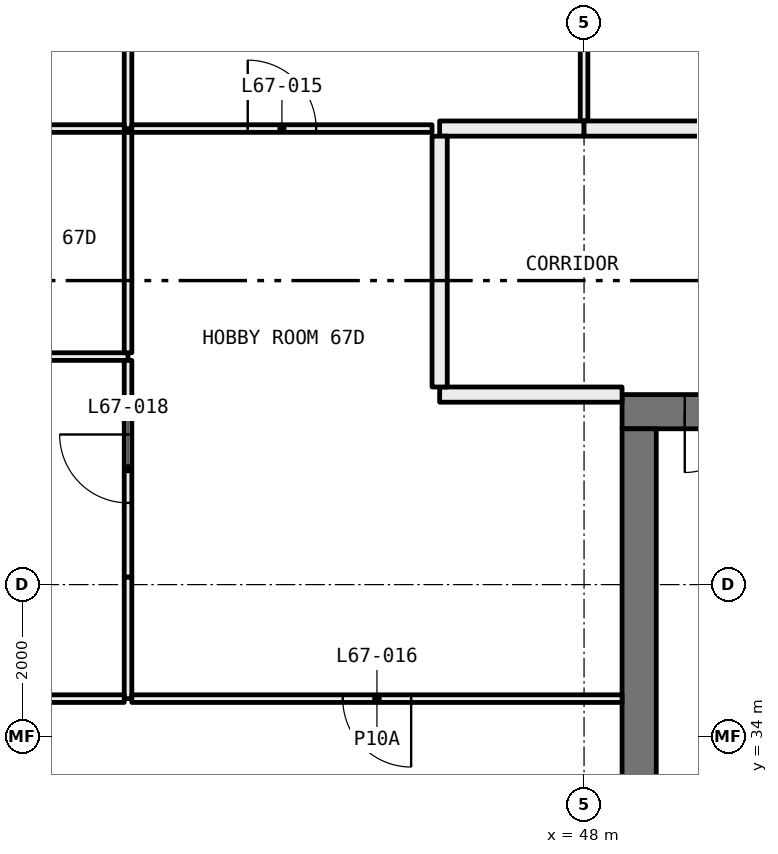
"""IFC4 building model, lengths in metres.
Left out: names, types, materials, properties, quantities, classifications, styles, units other than length and angle.
Written with IfcOpenShell. Run it as: python <this file> out.ifc"""

import sys

from ifc_helpers import new_model, si_unit, direction, frame, frame_2d, origin, place, context, subcontext, project, spatial, rectangle, extrude, element, fill, save


model = new_model("IFC4")
c1 = context("Model", 3, precision=1e-05, world=origin(), true_north=direction((0.0, 1.0)))
c2 = subcontext(c1, "Body", "Model", "MODEL_VIEW")
j1 = project(units=[si_unit("LENGTHUNIT", "METRE"), si_unit("PLANEANGLEUNIT", "RADIAN")], contexts=[c1])
p1 = place(None, origin())
s1 = spatial("IfcSite", under=j1, at=p1, CompositionType="ELEMENT")
p2 = place(p1, origin())
s2 = spatial("IfcBuilding", under=s1, at=p2, CompositionType="ELEMENT")
p3 = place(p2, frame((0.0, 0.0, 249.0)))
s3 = spatial("IfcBuildingStorey", under=s2, at=p3, CompositionType="ELEMENT", Elevation=249.0)
p4 = place(p3, frame((42.0, 42.0, 0.0), z_axis=(0.0, 0.0, 1.0), x_axis=(0.0, 1.0, 0.0)))
e1 = element("IfcWall", 1, at=p4, inside=s3, PredefinedType="PARTITIONING", context=c2, shape_type="SweptSolid", body=[
    extrude(rectangle(XDim=5.28, YDim=0.1, at=frame_2d((2.64, 0.0))), origin(), (0.0, 0.0, 1.0), 3.05),
])
p5 = place(p4, frame((2.19, 0.0, 0.0)))
e2 = element("IfcOpeningElement", 2, at=p5, cuts=e1, PredefinedType="OPENING", context=c2, shape_type="SweptSolid", body=[
    extrude(rectangle(XDim=0.9, YDim=2.1, at=frame_2d((0.45, 1.05))), frame((0.0, 0.06, 0.0), z_axis=(0.0, -1.0, 0.0), x_axis=(1.0, 0.0, 0.0)), (0.0, 0.0, 1.0), 0.12),
])
p6 = place(p3, frame((36.1, 42.0, 0.0), z_axis=(0.0, 0.0, 1.0), x_axis=(1.0, 0.0, 0.0)))
e3 = element("IfcWall", 3, at=p6, inside=s3, PredefinedType="PARTITIONING", context=c2, shape_type="SweptSolid", body=[
    extrude(rectangle(XDim=5.85, YDim=0.1, at=frame_2d((2.925, 0.0))), origin(), (0.0, 0.0, 1.0), 3.05),
])
p7 = place(p3, frame((48.0, 42.1, 0.0), z_axis=(0.0, 0.0, 1.0), x_axis=(0.0, 1.0, 0.0)))
e4 = element("IfcWall", 4, at=p7, inside=s3, PredefinedType="PARTITIONING", context=c2, shape_type="SweptSolid", body=[
    extrude(rectangle(XDim=5.18, YDim=0.1, at=frame_2d((2.59, 0.0))), origin(), (0.0, 0.0, 1.0), 3.05),
])
p8 = place(p7, frame((2.14, 0.0, 0.0)))
e5 = element("IfcOpeningElement", 5, at=p8, cuts=e4, PredefinedType="OPENING", context=c2, shape_type="SweptSolid", body=[
    extrude(rectangle(XDim=0.9, YDim=2.1, at=frame_2d((0.45, 1.05))), frame((0.0, 0.06, 0.0), z_axis=(0.0, -1.0, 0.0), x_axis=(1.0, 0.0, 0.0)), (0.0, 0.0, 1.0), 0.12),
])
p9 = place(p3, frame((42.05, 42.0, 0.0), z_axis=(0.0, 0.0, 1.0), x_axis=(1.0, 0.0, 0.0)))
e6 = element("IfcWall", 6, at=p9, inside=s3, PredefinedType="PARTITIONING", context=c2, shape_type="SweptSolid", body=[
    extrude(rectangle(XDim=3.95, YDim=0.1, at=frame_2d((1.975, 0.0))), origin(), (0.0, 0.0, 1.0), 3.05),
])
p10 = place(p9, frame((1.525, 0.0, 0.0)))
e7 = element("IfcOpeningElement", 7, at=p10, cuts=e6, PredefinedType="OPENING", context=c2, shape_type="SweptSolid", body=[
    extrude(rectangle(XDim=0.9, YDim=2.1, at=frame_2d((0.45, 1.05))), frame((0.0, 0.06, 0.0), z_axis=(0.0, -1.0, 0.0), x_axis=(1.0, 0.0, 0.0)), (0.0, 0.0, 1.0), 0.12),
])
p11 = place(p3, frame((46.1, 42.0, 0.0), z_axis=(0.0, 0.0, 1.0), x_axis=(1.0, 0.0, 0.0)))
e8 = element("IfcWall", 8, at=p11, inside=s3, PredefinedType="PARTITIONING", context=c2, shape_type="SweptSolid", body=[
    extrude(rectangle(XDim=1.9, YDim=0.2, at=frame_2d((0.95, 0.0))), origin(), (0.0, 0.0, 1.0), 3.05),
])
p12 = place(p3, frame((48.0, 42.0, 0.0), z_axis=(0.0, 0.0, 1.0), x_axis=(1.0, 0.0, 0.0)))
e9 = element("IfcWall", 9, at=p12, inside=s3, PredefinedType="PARTITIONING", context=c2, shape_type="SweptSolid", body=[
    extrude(rectangle(XDim=3.5, YDim=0.2, at=frame_2d((1.75, 0.0))), origin(), (0.0, 0.0, 1.0), 3.05),
])
p13 = place(p3, frame((42.0, 39.0, 0.0), z_axis=(0.0, 0.0, 1.0), x_axis=(-1.0, 0.0, 0.0)))
e10 = element("IfcWall", 10, at=p13, inside=s3, PredefinedType="PARTITIONING", context=c2, shape_type="SweptSolid", body=[
    extrude(rectangle(XDim=5.9, YDim=0.1, at=frame_2d((2.95, 0.0))), origin(), (0.0, 0.0, 1.0), 3.05),
])
p14 = place(p13, frame((2.5, 0.0, 0.0)))
e11 = element("IfcOpeningElement", 11, at=p14, cuts=e10, PredefinedType="OPENING", context=c2, shape_type="SweptSolid", body=[
    extrude(rectangle(XDim=0.9, YDim=2.1, at=frame_2d((0.45, 1.05))), frame((0.0, 0.06, 0.0), z_axis=(0.0, -1.0, 0.0), x_axis=(1.0, 0.0, 0.0)), (0.0, 0.0, 1.0), 0.12),
])
p15 = place(p3, frame((42.0, 34.5, 0.0), z_axis=(0.0, 0.0, 1.0), x_axis=(0.0, 1.0, 0.0)))
e12 = element("IfcWall", 12, at=p15, inside=s3, PredefinedType="PARTITIONING", context=c2, shape_type="SweptSolid", body=[
    extrude(rectangle(XDim=1.6, YDim=0.1, at=frame_2d((0.8, 0.0))), origin(), (0.0, 0.0, 1.0), 2.45),
])
p16 = place(p3, frame((42.0, 36.1, 0.0), z_axis=(0.0, 0.0, 1.0), x_axis=(0.0, 1.0, 0.0)))
e13 = element("IfcWall", 13, at=p16, inside=s3, PredefinedType="PARTITIONING", context=c2, shape_type="SweptSolid", body=[
    extrude(rectangle(XDim=2.85, YDim=0.1, at=frame_2d((1.425, 0.0))), origin(), (0.0, 0.0, 1.0), 3.05),
])
p17 = place(p16, frame((0.975, 0.0, 0.0)))
e14 = element("IfcOpeningElement", 14, at=p17, cuts=e13, PredefinedType="OPENING", context=c2, shape_type="SweptSolid", body=[
    extrude(rectangle(XDim=0.9, YDim=2.1, at=frame_2d((0.45, 1.05))), frame((0.0, 0.06, 0.0), z_axis=(0.0, -1.0, 0.0), x_axis=(1.0, 0.0, 0.0)), (0.0, 0.0, 1.0), 0.12),
])
p18 = place(p3, frame((40.575, 34.5, 0.0), z_axis=(0.0, 0.0, 1.0), x_axis=(1.0, 0.0, 0.0)))
e15 = element("IfcWall", 15, at=p18, inside=s3, PredefinedType="PARTITIONING", context=c2, shape_type="SweptSolid", body=[
    extrude(rectangle(XDim=1.375, YDim=0.1, at=frame_2d((0.688, 0.0))), origin(), (0.0, 0.0, 1.0), 3.05),
])
p19 = place(p3, frame((42.0, 39.05, 0.0), z_axis=(0.0, 0.0, 1.0), x_axis=(0.0, 1.0, 0.0)))
e16 = element("IfcWall", 16, at=p19, inside=s3, PredefinedType="PARTITIONING", context=c2, shape_type="SweptSolid", body=[
    extrude(rectangle(XDim=2.9, YDim=0.1, at=frame_2d((1.45, 0.0))), origin(), (0.0, 0.0, 1.0), 3.05),
])
p20 = place(p3, frame((42.05, 34.5, 0.0), z_axis=(0.0, 0.0, 1.0), x_axis=(1.0, 0.0, 0.0)))
e17 = element("IfcWall", 17, at=p20, inside=s3, PredefinedType="PARTITIONING", context=c2, shape_type="SweptSolid", body=[
    extrude(rectangle(XDim=6.45, YDim=0.1, at=frame_2d((3.225, 0.0))), origin(), (0.0, 0.0, 1.0), 3.05),
])
p21 = place(p20, frame((2.775, 0.0, 0.0)))
e18 = element("IfcOpeningElement", 18, at=p21, cuts=e17, PredefinedType="OPENING", context=c2, shape_type="SweptSolid", body=[
    extrude(rectangle(XDim=0.9, YDim=2.1, at=frame_2d((0.45, 1.05))), frame((0.0, 0.06, 0.0), z_axis=(0.0, -1.0, 0.0), x_axis=(1.0, 0.0, 0.0)), (0.0, 0.0, 1.0), 0.12),
])
p22 = place(p3, frame((48.5, 38.5, 0.0), z_axis=(0.0, 0.0, 1.0), x_axis=(-1.0, 0.0, 0.0)))
e19 = element("IfcWall", 19, at=p22, inside=s3, PredefinedType="PARTITIONING", context=c2, shape_type="SweptSolid", body=[
    extrude(rectangle(XDim=2.4, YDim=0.2, at=frame_2d((1.2, 0.0))), origin(), (0.0, 0.0, 1.0), 3.05),
])
p23 = place(p3, frame((46.1, 38.6, 0.0), z_axis=(0.0, 0.0, 1.0), x_axis=(0.0, 1.0, 0.0)))
e20 = element("IfcWall", 20, at=p23, inside=s3, PredefinedType="PARTITIONING", context=c2, shape_type="SweptSolid", body=[
    extrude(rectangle(XDim=3.3, YDim=0.2, at=frame_2d((1.65, 0.0))), origin(), (0.0, 0.0, 1.0), 3.05),
])
p24 = place(p3, frame((59.5, 38.275, 0.0), z_axis=(0.0, 0.0, 1.0), x_axis=(-1.0, 0.0, 0.0)))
e21 = element("IfcWall", 21, at=p24, inside=s3, PredefinedType="SHEAR", context=c2, shape_type="SweptSolid", body=[
    extrude(rectangle(XDim=11.0, YDim=0.45, at=frame_2d((5.5, 0.0))), origin(), (0.0, 0.0, 1.0), 3.05),
])
p25 = place(p24, frame((8.575, 0.0, 0.0)))
e22 = element("IfcOpeningElement", 22, at=p25, cuts=e21, PredefinedType="OPENING", context=c2, shape_type="SweptSolid", body=[
    extrude(rectangle(XDim=1.6, YDim=2.1, at=frame_2d((0.8, 1.05))), frame((0.0, 0.235, 0.0), z_axis=(0.0, -1.0, 0.0), x_axis=(1.0, 0.0, 0.0)), (0.0, 0.0, 1.0), 0.47),
])
p26 = place(p3, frame((48.725, 21.95, 0.0), z_axis=(0.0, 0.0, 1.0), x_axis=(0.0, 1.0, 0.0)))
e23 = element("IfcWall", 23, at=p26, inside=s3, PredefinedType="SHEAR", context=c2, shape_type="SweptSolid", body=[
    extrude(rectangle(XDim=16.1, YDim=0.45, at=frame_2d((8.05, 0.0))), origin(), (0.0, 0.0, 1.0), 3.05),
])
p27 = place(p26, frame((7.25, 0.0, 0.0)))
e24 = element("IfcOpeningElement", 24, at=p27, cuts=e23, PredefinedType="OPENING", context=c2, shape_type="SweptSolid", body=[
    extrude(rectangle(XDim=1.6, YDim=2.1, at=frame_2d((0.8, 1.05))), frame((0.0, 0.235, 0.0), z_axis=(0.0, -1.0, 0.0), x_axis=(1.0, 0.0, 0.0)), (0.0, 0.0, 1.0), 0.47),
])
p28 = place(p10, origin())
e25 = element("IfcDoor", 25, at=p28, inside=s3, OperationType="SINGLE_SWING_RIGHT", PredefinedType="DOOR", context=c2, shape_type="SweptSolid", body=[
    extrude(rectangle(XDim=0.9, YDim=2.1, at=frame_2d((0.45, 1.05))), frame((0.0, 0.025, 0.0), z_axis=(0.0, -1.0, 0.0), x_axis=(1.0, 0.0, 0.0)), (0.0, 0.0, 1.0), 0.05),
])
fill(e7, e25)
p29 = place(p21, frame((0.9, 0.0, 0.0), x_axis=(-1.0, 0.0, 0.0)))
e26 = element("IfcDoor", 26, at=p29, inside=s3, OperationType="SINGLE_SWING_RIGHT", PredefinedType="DOOR", context=c2, shape_type="SweptSolid", body=[
    extrude(rectangle(XDim=0.9, YDim=2.1, at=frame_2d((0.45, 1.05))), frame((0.0, 0.025, 0.0), z_axis=(0.0, -1.0, 0.0), x_axis=(1.0, 0.0, 0.0)), (0.0, 0.0, 1.0), 0.05),
])
fill(e18, e26)
p30 = place(p17, origin())
e27 = element("IfcDoor", 27, at=p30, inside=s3, OperationType="SINGLE_SWING_LEFT", PredefinedType="DOOR", context=c2, shape_type="SweptSolid", body=[
    extrude(rectangle(XDim=0.9, YDim=2.1, at=frame_2d((0.45, 1.05))), frame((0.0, 0.025, 0.0), z_axis=(0.0, -1.0, 0.0), x_axis=(1.0, 0.0, 0.0)), (0.0, 0.0, 1.0), 0.05),
])
fill(e14, e27)
p31 = place(p25, origin())
e28 = element("IfcDoor", 28, at=p31, inside=s3, OperationType="DOUBLE_DOOR_SINGLE_SWING", PredefinedType="DOOR", context=c2, shape_type="SweptSolid", body=[
    extrude(rectangle(XDim=1.6, YDim=2.1, at=frame_2d((0.8, 1.05))), frame((0.0, 0.025, 0.0), z_axis=(0.0, -1.0, 0.0), x_axis=(1.0, 0.0, 0.0)), (0.0, 0.0, 1.0), 0.05),
])
fill(e22, e28)
save(model, sys.argv[1])
